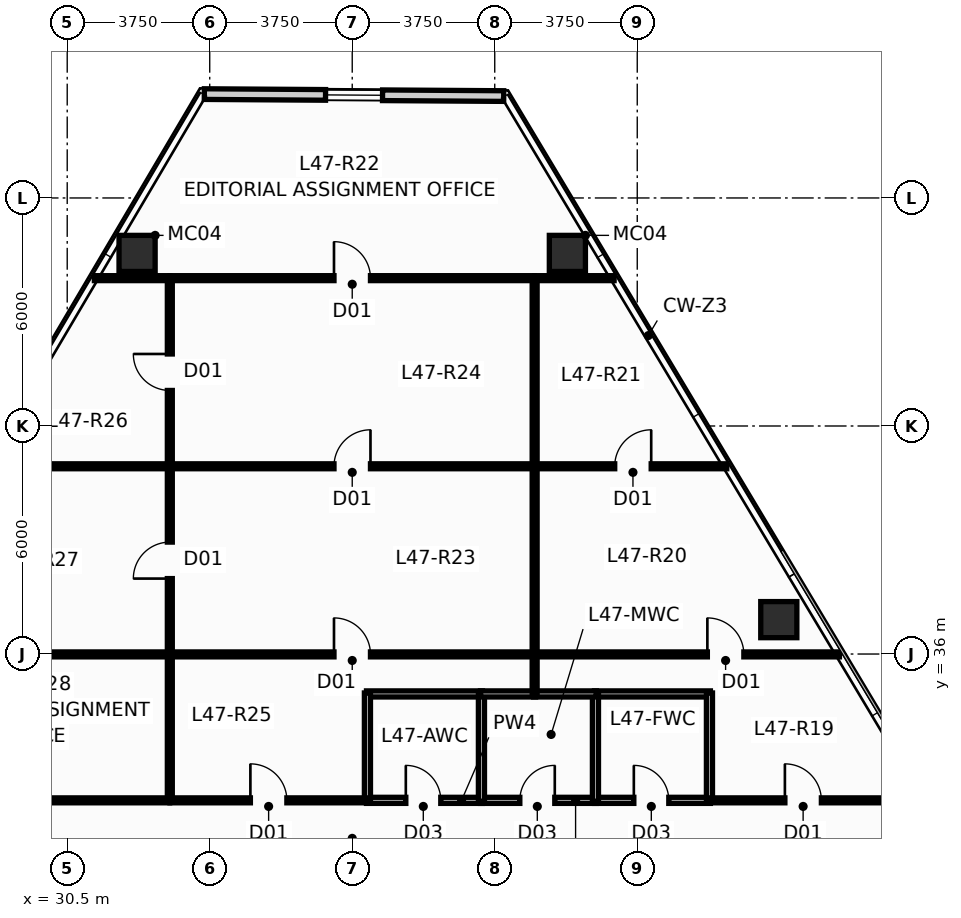
"""IFC4 building model, lengths in metres.
Left out: names, types, materials, properties, quantities, classifications, styles, units other than length and angle.
Written with IfcOpenShell. Run it as: python <this file> out.ifc"""

import sys

from ifc_helpers import new_model, si_unit, direction, frame, frame_2d, origin, origin_2d, place, context, subcontext, project, spatial, rectangle, hollow_rectangle, extrude, source, transform, mapped, element, fill, save


model = new_model("IFC4")
c1 = context("Model", 3, precision=1e-05, world=origin(), true_north=direction((0.0, 1.0)))
c2 = subcontext(c1, "Body", "Model", "MODEL_VIEW")
j1 = project(units=[si_unit("LENGTHUNIT", "METRE"), si_unit("PLANEANGLEUNIT", "RADIAN")], contexts=[c1])
p1 = place(None, origin())
s1 = spatial("IfcSite", under=j1, at=p1, CompositionType="ELEMENT")
p2 = place(p1, origin())
s2 = spatial("IfcBuilding", under=s1, at=p2, CompositionType="ELEMENT")
p3 = place(p2, frame((0.0, 0.0, 180.4)))
s3 = spatial("IfcBuildingStorey", under=s2, at=p3, CompositionType="ELEMENT", Elevation=180.4)
m1 = source(origin(), c2, "Body", "SweptSolid", [
    extrude(hollow_rectangle(XDim=0.95, YDim=0.95, WallThickness=0.05, at=origin_2d()), origin(), (0.0, 0.0, 1.0), 3.651),
])
for number, where, z_axis, x_axis in (
    (1, (43.662, 46.541, 0.0), (-0.024, 0.002, 1.0), (-0.072, -0.997, 0.0)),
    (2, (32.338, 46.541, 0.0), (0.024, 0.002, 1.0), (-0.072, 0.997, 0.0)),
):
    element("IfcColumn", number, at=place(p3, frame(where, z_axis=z_axis, x_axis=x_axis)), inside=s3, PredefinedType="COLUMN", context=c2, shape_type="MappedRepresentation", body=[
        mapped(m1, transform((0.0, 0.0, 0.0), scale=1.0)),
    ])
m2 = source(origin(), c2, "Body", "SweptSolid", [
    extrude(hollow_rectangle(XDim=0.95, YDim=0.95, WallThickness=0.05, at=origin_2d()), origin(), (0.0, 0.0, 1.0), 3.651),
])
p4 = place(p3, frame((49.225, 36.905, 0.0), z_axis=(-0.01939269685, -0.00601842316, 0.999793829693), x_axis=(0.296399214872, -0.955064136811, 0.0)))
e3 = element("IfcColumn", 3, at=p4, inside=s3, PredefinedType="COLUMN", context=c2, shape_type="MappedRepresentation", body=[
    mapped(m2, transform((0.0, 0.0, 0.0), scale=1.0)),
])
p5 = place(p3, frame((34.108, 50.733, 0.0), z_axis=(0.0, 0.0, 1.0), x_axis=(0.999978419741, -0.00656963107, 0.0)))
e4 = element("IfcWall", 4, at=p5, inside=s3, PredefinedType="STANDARD", context=c2, shape_type="SweptSolid", body=[
    extrude(rectangle(XDim=7.878, YDim=0.28, at=frame_2d((3.939, 0.0))), origin(), (0.0, 0.0, 1.0), 3.4),
])
p6 = place(p5, frame((3.19, 0.0, 0.9)))
e5 = element("IfcOpeningElement", 5, at=p6, cuts=e4, PredefinedType="OPENING", context=c2, shape_type="SweptSolid", body=[
    extrude(rectangle(XDim=1.5, YDim=1.8, at=frame_2d((0.75, 0.9))), frame((0.0, 0.152, 0.0), z_axis=(0.0, -1.0, 0.0), x_axis=(1.0, 0.0, 0.0)), (0.0, 0.0, 1.0), 0.304),
])
p7 = place(p3, frame((38.375, 32.15, 0.0), z_axis=(0.0, 0.0, 1.0), x_axis=(1.0, 0.0, 0.0)))
e6 = element("IfcWall", 6, at=p7, inside=s3, PredefinedType="PLUMBINGWALL", context=c2, shape_type="SweptSolid", body=[
    extrude(rectangle(XDim=3.05, YDim=0.16, at=frame_2d((1.525, 0.0))), origin(), (0.0, 0.0, 1.0), 3.078),
])
p8 = place(p7, frame((1.035, 0.0, 0.0)))
e7 = element("IfcOpeningElement", 7, at=p8, cuts=e6, PredefinedType="OPENING", context=c2, shape_type="SweptSolid", body=[
    extrude(rectangle(XDim=0.92, YDim=2.1, at=frame_2d((0.46, 1.05))), frame((0.0, 0.092, 0.0), z_axis=(0.0, -1.0, 0.0), x_axis=(1.0, 0.0, 0.0)), (0.0, 0.0, 1.0), 0.184),
])
p9 = place(p3, frame((41.375, 32.15, 0.0), z_axis=(0.0, 0.0, 1.0), x_axis=(1.0, 0.0, 0.0)))
e8 = element("IfcWall", 8, at=p9, inside=s3, PredefinedType="PLUMBINGWALL", context=c2, shape_type="SweptSolid", body=[
    extrude(rectangle(XDim=3.05, YDim=0.16, at=frame_2d((1.525, 0.0))), origin(), (0.0, 0.0, 1.0), 3.078),
])
p10 = place(p9, frame((1.035, 0.0, 0.0)))
e9 = element("IfcOpeningElement", 9, at=p10, cuts=e8, PredefinedType="OPENING", context=c2, shape_type="SweptSolid", body=[
    extrude(rectangle(XDim=0.92, YDim=2.1, at=frame_2d((0.46, 1.05))), frame((0.0, 0.092, 0.0), z_axis=(0.0, -1.0, 0.0), x_axis=(1.0, 0.0, 0.0)), (0.0, 0.0, 1.0), 0.184),
])
p11 = place(p3, frame((44.375, 32.15, 0.0), z_axis=(0.0, 0.0, 1.0), x_axis=(1.0, 0.0, 0.0)))
e10 = element("IfcWall", 10, at=p11, inside=s3, PredefinedType="PLUMBINGWALL", context=c2, shape_type="SweptSolid", body=[
    extrude(rectangle(XDim=3.05, YDim=0.16, at=frame_2d((1.525, 0.0))), origin(), (0.0, 0.0, 1.0), 3.078),
])
p12 = place(p11, frame((1.035, 0.0, 0.0)))
e11 = element("IfcOpeningElement", 11, at=p12, cuts=e10, PredefinedType="OPENING", context=c2, shape_type="SweptSolid", body=[
    extrude(rectangle(XDim=0.92, YDim=2.1, at=frame_2d((0.46, 1.05))), frame((0.0, 0.092, 0.0), z_axis=(0.0, -1.0, 0.0), x_axis=(1.0, 0.0, 0.0)), (0.0, 0.0, 1.0), 0.184),
])
for number, where, z_axis, x_axis in (
    (12, (38.375, 34.95, 0.0), (0.0, 0.0, 1.0), (1.0, 0.0, 0.0)),
    (13, (47.425, 34.95, 0.0), (0.0, 0.0, 1.0), (-1.0, 0.0, 0.0)),
):
    element("IfcWall", number, at=place(p3, frame(where, z_axis=z_axis, x_axis=x_axis)), inside=s3, PredefinedType="PLUMBINGWALL", context=c2, shape_type="SweptSolid", body=[
        extrude(rectangle(XDim=3.05, YDim=0.16, at=frame_2d((1.525, 0.0))), origin(), (0.0, 0.0, 1.0), 3.078),
    ])
for number, where, z_axis, x_axis in (
    (14, (41.4, 32.125, 0.0), (0.0, 0.0, 1.0), (0.0, 1.0, 0.0)),
    (15, (38.4, 32.125, 0.0), (0.0, 0.0, 1.0), (0.0, 1.0, 0.0)),
):
    element("IfcWall", number, at=place(p3, frame(where, z_axis=z_axis, x_axis=x_axis)), inside=s3, PredefinedType="PLUMBINGWALL", context=c2, shape_type="SweptSolid", body=[
        extrude(rectangle(XDim=2.85, YDim=0.16, at=frame_2d((1.425, 0.0))), origin(), (0.0, 0.0, 1.0), 3.4),
    ])
p13 = place(p3, frame((44.4, 32.125, 0.0), z_axis=(0.0, 0.0, 1.0), x_axis=(0.0, 1.0, 0.0)))
e16 = element("IfcWall", 16, at=p13, inside=s3, PredefinedType="PLUMBINGWALL", context=c2, shape_type="SweptSolid", body=[
    extrude(rectangle(XDim=2.85, YDim=0.16, at=frame_2d((1.425, 0.0))), origin(), (0.0, 0.0, 1.0), 2.925),
])
p14 = place(p3, frame((47.4, 32.125, 0.0), z_axis=(0.0, 0.0, 1.0), x_axis=(0.0, 1.0, 0.0)))
e17 = element("IfcWall", 17, at=p14, inside=s3, PredefinedType="PLUMBINGWALL", context=c2, shape_type="SweptSolid", body=[
    extrude(rectangle(XDim=2.85, YDim=0.16, at=frame_2d((1.425, 0.0))), origin(), (0.0, 0.0, 1.0), 3.4),
])
p15 = place(p3, frame((42.775, 34.95, 0.0), z_axis=(0.0, 0.0, 1.0), x_axis=(1.0, 0.0, 0.0)))
e18 = element("IfcWall", 18, at=p15, inside=s3, PredefinedType="PLUMBINGWALL", context=c2, shape_type="SweptSolid", body=[
    extrude(rectangle(XDim=1.65, YDim=0.16, at=frame_2d((0.825, 0.0))), origin(), (0.0, 0.0, 1.0), 3.078),
])
p16 = place(p3, frame((41.375, 34.95, 0.0), z_axis=(0.0, 0.0, 1.0), x_axis=(1.0, 0.0, 0.0)))
e19 = element("IfcWall", 19, at=p16, inside=s3, PredefinedType="PLUMBINGWALL", context=c2, shape_type="SweptSolid", body=[
    extrude(rectangle(XDim=1.45, YDim=0.16, at=frame_2d((0.725, 0.0))), origin(), (0.0, 0.0, 1.0), 3.078),
])
p17 = place(p3, frame((23.136, 32.15, 0.0), z_axis=(0.0, 0.0, 1.0), x_axis=(1.0, 0.0, 0.0)))
e20 = element("IfcWall", 20, at=p17, inside=s3, PredefinedType="PARTITIONING", context=c2, shape_type="SweptSolid", body=[
    extrude(rectangle(XDim=10.059, YDim=0.13, at=frame_2d((5.03, 0.0))), origin(), (0.0, 0.0, 1.0), 3.078),
])
p18 = place(p17, frame((4.357, 0.0, 0.0)))
e21 = element("IfcOpeningElement", 21, at=p18, cuts=e20, PredefinedType="OPENING", context=c2, shape_type="SweptSolid", body=[
    extrude(rectangle(XDim=0.96, YDim=2.15, at=frame_2d((0.48, 1.075))), frame((0.0, 0.077, 0.0), z_axis=(0.0, -1.0, 0.0), x_axis=(1.0, 0.0, 0.0)), (0.0, 0.0, 1.0), 0.154),
])
p19 = place(p3, frame((33.205, 45.89, 0.0), z_axis=(0.0, 0.0, 1.0), x_axis=(1.0, 0.0, 0.0)))
e22 = element("IfcWall", 22, at=p19, inside=s3, PredefinedType="PARTITIONING", context=c2, shape_type="SweptSolid", body=[
    extrude(rectangle(XDim=9.59, YDim=0.13, at=frame_2d((4.795, 0.0))), origin(), (0.0, 0.0, 1.0), 3.4),
])
p20 = place(p19, frame((4.315, 0.0, 0.0)))
e23 = element("IfcOpeningElement", 23, at=p20, cuts=e22, PredefinedType="OPENING", context=c2, shape_type="SweptSolid", body=[
    extrude(rectangle(XDim=0.96, YDim=2.15, at=frame_2d((0.48, 1.075))), frame((0.0, 0.077, 0.0), z_axis=(0.0, -1.0, 0.0), x_axis=(1.0, 0.0, 0.0)), (0.0, 0.0, 1.0), 0.154),
])
p21 = place(p3, frame((33.205, 40.94, 0.0), z_axis=(0.0, 0.0, 1.0), x_axis=(1.0, 0.0, 0.0)))
e24 = element("IfcWall", 24, at=p21, inside=s3, PredefinedType="PARTITIONING", context=c2, shape_type="SweptSolid", body=[
    extrude(rectangle(XDim=9.59, YDim=0.13, at=frame_2d((4.795, 0.0))), origin(), (0.0, 0.0, 1.0), 3.4),
])
p22 = place(p21, frame((4.315, 0.0, 0.0)))
e25 = element("IfcOpeningElement", 25, at=p22, cuts=e24, PredefinedType="OPENING", context=c2, shape_type="SweptSolid", body=[
    extrude(rectangle(XDim=0.96, YDim=2.15, at=frame_2d((0.48, 1.075))), frame((0.0, 0.077, 0.0), z_axis=(0.0, -1.0, 0.0), x_axis=(1.0, 0.0, 0.0)), (0.0, 0.0, 1.0), 0.154),
])
p23 = place(p3, frame((33.205, 35.99, 0.0), z_axis=(0.0, 0.0, 1.0), x_axis=(1.0, 0.0, 0.0)))
e26 = element("IfcWall", 26, at=p23, inside=s3, PredefinedType="PARTITIONING", context=c2, shape_type="SweptSolid", body=[
    extrude(rectangle(XDim=9.59, YDim=0.13, at=frame_2d((4.795, 0.0))), origin(), (0.0, 0.0, 1.0), 3.4),
])
p24 = place(p23, frame((4.315, 0.0, 0.0)))
e27 = element("IfcOpeningElement", 27, at=p24, cuts=e26, PredefinedType="OPENING", context=c2, shape_type="SweptSolid", body=[
    extrude(rectangle(XDim=0.96, YDim=2.15, at=frame_2d((0.48, 1.075))), frame((0.0, 0.077, 0.0), z_axis=(0.0, -1.0, 0.0), x_axis=(1.0, 0.0, 0.0)), (0.0, 0.0, 1.0), 0.154),
])
p25 = place(p3, frame((42.805, 35.99, 0.0), z_axis=(0.0, 0.0, 1.0), x_axis=(1.0, 0.0, 0.0)))
e28 = element("IfcWall", 28, at=p25, inside=s3, PredefinedType="PARTITIONING", context=c2, shape_type="SweptSolid", body=[
    extrude(rectangle(XDim=8.015, YDim=0.13, at=frame_2d((4.008, 0.0))), origin(), (0.0, 0.0, 1.0), 3.4),
])
p26 = place(p25, frame((4.54, 0.0, 0.0)))
e29 = element("IfcOpeningElement", 29, at=p26, cuts=e28, PredefinedType="OPENING", context=c2, shape_type="SweptSolid", body=[
    extrude(rectangle(XDim=0.96, YDim=2.15, at=frame_2d((0.48, 1.075))), frame((0.0, 0.077, 0.0), z_axis=(0.0, -1.0, 0.0), x_axis=(1.0, 0.0, 0.0)), (0.0, 0.0, 1.0), 0.154),
])
p27 = place(p3, frame((25.375, 35.99, 0.0), z_axis=(0.0, 0.0, 1.0), x_axis=(1.0, 0.0, 0.0)))
e30 = element("IfcWall", 30, at=p27, inside=s3, PredefinedType="PARTITIONING", context=c2, shape_type="SweptSolid", body=[
    extrude(rectangle(XDim=7.82, YDim=0.13, at=frame_2d((3.91, 0.0))), origin(), (0.0, 0.0, 1.0), 3.4),
])
p28 = place(p3, frame((33.205, 32.15, 0.0), z_axis=(0.0, 0.0, 1.0), x_axis=(1.0, 0.0, 0.0)))
e31 = element("IfcWall", 31, at=p28, inside=s3, PredefinedType="PARTITIONING", context=c2, shape_type="SweptSolid", body=[
    extrude(rectangle(XDim=5.19, YDim=0.13, at=frame_2d((2.595, 0.0))), origin(), (0.0, 0.0, 1.0), 3.078),
])
p29 = place(p28, frame((2.115, 0.0, 0.0)))
e32 = element("IfcOpeningElement", 32, at=p29, cuts=e31, PredefinedType="OPENING", context=c2, shape_type="SweptSolid", body=[
    extrude(rectangle(XDim=0.96, YDim=2.15, at=frame_2d((0.48, 1.075))), frame((0.0, 0.077, 0.0), z_axis=(0.0, -1.0, 0.0), x_axis=(1.0, 0.0, 0.0)), (0.0, 0.0, 1.0), 0.154),
])
p30 = place(p3, frame((42.805, 40.94, 0.0), z_axis=(0.0, 0.0, 1.0), x_axis=(1.0, 0.0, 0.0)))
e33 = element("IfcWall", 33, at=p30, inside=s3, PredefinedType="PARTITIONING", context=c2, shape_type="SweptSolid", body=[
    extrude(rectangle(XDim=5.051, YDim=0.13, at=frame_2d((2.525, 0.0))), origin(), (0.0, 0.0, 1.0), 3.4),
])
p31 = place(p30, frame((2.102, 0.0, 0.0)))
e34 = element("IfcOpeningElement", 34, at=p31, cuts=e33, PredefinedType="OPENING", context=c2, shape_type="SweptSolid", body=[
    extrude(rectangle(XDim=0.96, YDim=2.15, at=frame_2d((0.48, 1.075))), frame((0.0, 0.077, 0.0), z_axis=(0.0, -1.0, 0.0), x_axis=(1.0, 0.0, 0.0)), (0.0, 0.0, 1.0), 0.154),
])
p32 = place(p3, frame((47.405, 32.15, 0.0), z_axis=(0.0, 0.0, 1.0), x_axis=(1.0, 0.0, 0.0)))
e35 = element("IfcWall", 35, at=p32, inside=s3, PredefinedType="PARTITIONING", context=c2, shape_type="SweptSolid", body=[
    extrude(rectangle(XDim=5.689, YDim=0.13, at=frame_2d((2.845, 0.0))), origin(), (0.0, 0.0, 1.0), 3.4),
])
p33 = place(p32, frame((1.98, 0.0, 0.0)))
e36 = element("IfcOpeningElement", 36, at=p33, cuts=e35, PredefinedType="OPENING", context=c2, shape_type="SweptSolid", body=[
    extrude(rectangle(XDim=0.96, YDim=2.15, at=frame_2d((0.48, 1.075))), frame((0.0, 0.077, 0.0), z_axis=(0.0, -1.0, 0.0), x_axis=(1.0, 0.0, 0.0)), (0.0, 0.0, 1.0), 0.154),
])
p34 = place(p3, frame((28.295, 40.94, 0.0), z_axis=(0.0, 0.0, 1.0), x_axis=(1.0, 0.0, 0.0)))
e37 = element("IfcWall", 37, at=p34, inside=s3, PredefinedType="PARTITIONING", context=c2, shape_type="SweptSolid", body=[
    extrude(rectangle(XDim=4.9, YDim=0.13, at=frame_2d((2.45, 0.0))), origin(), (0.0, 0.0, 1.0), 3.4),
])
p35 = place(p3, frame((42.8, 40.945, 0.0), z_axis=(0.0, 0.0, 1.0), x_axis=(0.0, 1.0, 0.0)))
e38 = element("IfcWall", 38, at=p35, inside=s3, PredefinedType="PARTITIONING", context=c2, shape_type="SweptSolid", body=[
    extrude(rectangle(XDim=4.94, YDim=0.13, at=frame_2d((2.47, 0.0))), origin(), (0.0, 0.0, 1.0), 3.4),
])
p36 = place(p3, frame((33.2, 40.945, 0.0), z_axis=(0.0, 0.0, 1.0), x_axis=(0.0, 1.0, 0.0)))
e39 = element("IfcWall", 39, at=p36, inside=s3, PredefinedType="PARTITIONING", context=c2, shape_type="SweptSolid", body=[
    extrude(rectangle(XDim=4.94, YDim=0.13, at=frame_2d((2.47, 0.0))), origin(), (0.0, 0.0, 1.0), 3.4),
])
p37 = place(p36, frame((1.99, 0.0, 0.0)))
e40 = element("IfcOpeningElement", 40, at=p37, cuts=e39, PredefinedType="OPENING", context=c2, shape_type="SweptSolid", body=[
    extrude(rectangle(XDim=0.96, YDim=2.15, at=frame_2d((0.48, 1.075))), frame((0.0, 0.077, 0.0), z_axis=(0.0, -1.0, 0.0), x_axis=(1.0, 0.0, 0.0)), (0.0, 0.0, 1.0), 0.154),
])
p38 = place(p3, frame((42.8, 35.995, 0.0), z_axis=(0.0, 0.0, 1.0), x_axis=(0.0, 1.0, 0.0)))
e41 = element("IfcWall", 41, at=p38, inside=s3, PredefinedType="PARTITIONING", context=c2, shape_type="SweptSolid", body=[
    extrude(rectangle(XDim=4.94, YDim=0.13, at=frame_2d((2.47, 0.0))), origin(), (0.0, 0.0, 1.0), 3.4),
])
p39 = place(p3, frame((33.2, 35.995, 0.0), z_axis=(0.0, 0.0, 1.0), x_axis=(0.0, 1.0, 0.0)))
e42 = element("IfcWall", 42, at=p39, inside=s3, PredefinedType="PARTITIONING", context=c2, shape_type="SweptSolid", body=[
    extrude(rectangle(XDim=4.94, YDim=0.13, at=frame_2d((2.47, 0.0))), origin(), (0.0, 0.0, 1.0), 3.4),
])
p40 = place(p39, frame((1.99, 0.0, 0.0)))
e43 = element("IfcOpeningElement", 43, at=p40, cuts=e42, PredefinedType="OPENING", context=c2, shape_type="SweptSolid", body=[
    extrude(rectangle(XDim=0.96, YDim=2.15, at=frame_2d((0.48, 1.075))), frame((0.0, 0.077, 0.0), z_axis=(0.0, -1.0, 0.0), x_axis=(1.0, 0.0, 0.0)), (0.0, 0.0, 1.0), 0.154),
])
p41 = place(p3, frame((33.2, 32.155, 0.0), z_axis=(0.0, 0.0, 1.0), x_axis=(0.0, 1.0, 0.0)))
e44 = element("IfcWall", 44, at=p41, inside=s3, PredefinedType="PARTITIONING", context=c2, shape_type="SweptSolid", body=[
    extrude(rectangle(XDim=3.83, YDim=0.13, at=frame_2d((1.915, 0.0))), origin(), (0.0, 0.0, 1.0), 3.4),
])
p42 = place(p3, frame((42.805, 45.89, 0.0), z_axis=(0.0, 0.0, 1.0), x_axis=(1.0, 0.0, 0.0)))
e45 = element("IfcWall", 45, at=p42, inside=s3, PredefinedType="PARTITIONING", context=c2, shape_type="SweptSolid", body=[
    extrude(rectangle(XDim=2.086, YDim=0.13, at=frame_2d((1.043, 0.0))), origin(), (0.0, 0.0, 1.0), 3.4),
])
p43 = place(p3, frame((31.215, 45.89, 0.0), z_axis=(0.0, 0.0, 1.0), x_axis=(1.0, 0.0, 0.0)))
e46 = element("IfcWall", 46, at=p43, inside=s3, PredefinedType="PARTITIONING", context=c2, shape_type="SweptSolid", body=[
    extrude(rectangle(XDim=1.98, YDim=0.13, at=frame_2d((0.99, 0.0))), origin(), (0.0, 0.0, 1.0), 3.4),
])
p44 = place(p3, frame((42.8, 34.955, 0.0), z_axis=(0.0, 0.0, 1.0), x_axis=(0.0, 1.0, 0.0)))
e47 = element("IfcWall", 47, at=p44, inside=s3, PredefinedType="PARTITIONING", context=c2, shape_type="SweptSolid", body=[
    extrude(rectangle(XDim=1.03, YDim=0.13, at=frame_2d((0.515, 0.0))), origin(), (0.0, 0.0, 1.0), 3.4),
])
p45 = place(p6, origin())
e48 = element("IfcWindow", 48, at=p45, inside=s3, PartitioningType="SINGLE_PANEL", PredefinedType="WINDOW", context=c2, shape_type="SweptSolid", body=[
    extrude(rectangle(XDim=1.5, YDim=1.8, at=frame_2d((0.75, 0.9))), frame((0.0, 0.03, 0.0), z_axis=(0.0, -1.0, 0.0), x_axis=(1.0, 0.0, 0.0)), (0.0, 0.0, 1.0), 0.06),
])
fill(e5, e48)
p46 = place(p8, origin())
e49 = element("IfcDoor", 49, at=p46, inside=s3, OperationType="SINGLE_SWING_LEFT", PredefinedType="DOOR", context=c2, shape_type="SweptSolid", body=[
    extrude(rectangle(XDim=0.92, YDim=2.1, at=frame_2d((0.46, 1.05))), frame((0.0, 0.025, 0.0), z_axis=(0.0, -1.0, 0.0), x_axis=(1.0, 0.0, 0.0)), (0.0, 0.0, 1.0), 0.05),
])
fill(e7, e49)
p47 = place(p10, origin())
e50 = element("IfcDoor", 50, at=p47, inside=s3, OperationType="SINGLE_SWING_RIGHT", PredefinedType="DOOR", context=c2, shape_type="SweptSolid", body=[
    extrude(rectangle(XDim=0.92, YDim=2.1, at=frame_2d((0.46, 1.05))), frame((0.0, 0.025, 0.0), z_axis=(0.0, -1.0, 0.0), x_axis=(1.0, 0.0, 0.0)), (0.0, 0.0, 1.0), 0.05),
])
fill(e9, e50)
p48 = place(p12, origin())
e51 = element("IfcDoor", 51, at=p48, inside=s3, OperationType="SINGLE_SWING_LEFT", PredefinedType="DOOR", context=c2, shape_type="SweptSolid", body=[
    extrude(rectangle(XDim=0.92, YDim=2.1, at=frame_2d((0.46, 1.05))), frame((0.0, 0.025, 0.0), z_axis=(0.0, -1.0, 0.0), x_axis=(1.0, 0.0, 0.0)), (0.0, 0.0, 1.0), 0.05),
])
fill(e11, e51)
p49 = place(p20, origin())
e52 = element("IfcDoor", 52, at=p49, inside=s3, OperationType="SINGLE_SWING_LEFT", PredefinedType="DOOR", context=c2, shape_type="SweptSolid", body=[
    extrude(rectangle(XDim=0.96, YDim=2.15, at=frame_2d((0.48, 1.075))), frame((0.0, 0.025, 0.0), z_axis=(0.0, -1.0, 0.0), x_axis=(1.0, 0.0, 0.0)), (0.0, 0.0, 1.0), 0.05),
])
fill(e23, e52)
p50 = place(p22, origin())
e53 = element("IfcDoor", 53, at=p50, inside=s3, OperationType="SINGLE_SWING_RIGHT", PredefinedType="DOOR", context=c2, shape_type="SweptSolid", body=[
    extrude(rectangle(XDim=0.96, YDim=2.15, at=frame_2d((0.48, 1.075))), frame((0.0, 0.025, 0.0), z_axis=(0.0, -1.0, 0.0), x_axis=(1.0, 0.0, 0.0)), (0.0, 0.0, 1.0), 0.05),
])
fill(e25, e53)
p51 = place(p24, origin())
e54 = element("IfcDoor", 54, at=p51, inside=s3, OperationType="SINGLE_SWING_LEFT", PredefinedType="DOOR", context=c2, shape_type="SweptSolid", body=[
    extrude(rectangle(XDim=0.96, YDim=2.15, at=frame_2d((0.48, 1.075))), frame((0.0, 0.025, 0.0), z_axis=(0.0, -1.0, 0.0), x_axis=(1.0, 0.0, 0.0)), (0.0, 0.0, 1.0), 0.05),
])
fill(e27, e54)
p52 = place(p26, origin())
e55 = element("IfcDoor", 55, at=p52, inside=s3, OperationType="SINGLE_SWING_LEFT", PredefinedType="DOOR", context=c2, shape_type="SweptSolid", body=[
    extrude(rectangle(XDim=0.96, YDim=2.15, at=frame_2d((0.48, 1.075))), frame((0.0, 0.025, 0.0), z_axis=(0.0, -1.0, 0.0), x_axis=(1.0, 0.0, 0.0)), (0.0, 0.0, 1.0), 0.05),
])
fill(e29, e55)
p53 = place(p29, origin())
e56 = element("IfcDoor", 56, at=p53, inside=s3, OperationType="SINGLE_SWING_LEFT", PredefinedType="DOOR", context=c2, shape_type="SweptSolid", body=[
    extrude(rectangle(XDim=0.96, YDim=2.15, at=frame_2d((0.48, 1.075))), frame((0.0, 0.025, 0.0), z_axis=(0.0, -1.0, 0.0), x_axis=(1.0, 0.0, 0.0)), (0.0, 0.0, 1.0), 0.05),
])
fill(e32, e56)
p54 = place(p31, origin())
e57 = element("IfcDoor", 57, at=p54, inside=s3, OperationType="SINGLE_SWING_RIGHT", PredefinedType="DOOR", context=c2, shape_type="SweptSolid", body=[
    extrude(rectangle(XDim=0.96, YDim=2.15, at=frame_2d((0.48, 1.075))), frame((0.0, 0.025, 0.0), z_axis=(0.0, -1.0, 0.0), x_axis=(1.0, 0.0, 0.0)), (0.0, 0.0, 1.0), 0.05),
])
fill(e34, e57)
p55 = place(p33, origin())
e58 = element("IfcDoor", 58, at=p55, inside=s3, OperationType="SINGLE_SWING_LEFT", PredefinedType="DOOR", context=c2, shape_type="SweptSolid", body=[
    extrude(rectangle(XDim=0.96, YDim=2.15, at=frame_2d((0.48, 1.075))), frame((0.0, 0.025, 0.0), z_axis=(0.0, -1.0, 0.0), x_axis=(1.0, 0.0, 0.0)), (0.0, 0.0, 1.0), 0.05),
])
fill(e36, e58)
p56 = place(p37, origin())
e59 = element("IfcDoor", 59, at=p56, inside=s3, OperationType="SINGLE_SWING_RIGHT", PredefinedType="DOOR", context=c2, shape_type="SweptSolid", body=[
    extrude(rectangle(XDim=0.96, YDim=2.15, at=frame_2d((0.48, 1.075))), frame((0.0, 0.025, 0.0), z_axis=(0.0, -1.0, 0.0), x_axis=(1.0, 0.0, 0.0)), (0.0, 0.0, 1.0), 0.05),
])
fill(e40, e59)
p57 = place(p40, origin())
e60 = element("IfcDoor", 60, at=p57, inside=s3, OperationType="SINGLE_SWING_LEFT", PredefinedType="DOOR", context=c2, shape_type="SweptSolid", body=[
    extrude(rectangle(XDim=0.96, YDim=2.15, at=frame_2d((0.48, 1.075))), frame((0.0, 0.025, 0.0), z_axis=(0.0, -1.0, 0.0), x_axis=(1.0, 0.0, 0.0)), (0.0, 0.0, 1.0), 0.05),
])
fill(e43, e60)
save(model, sys.argv[1])
